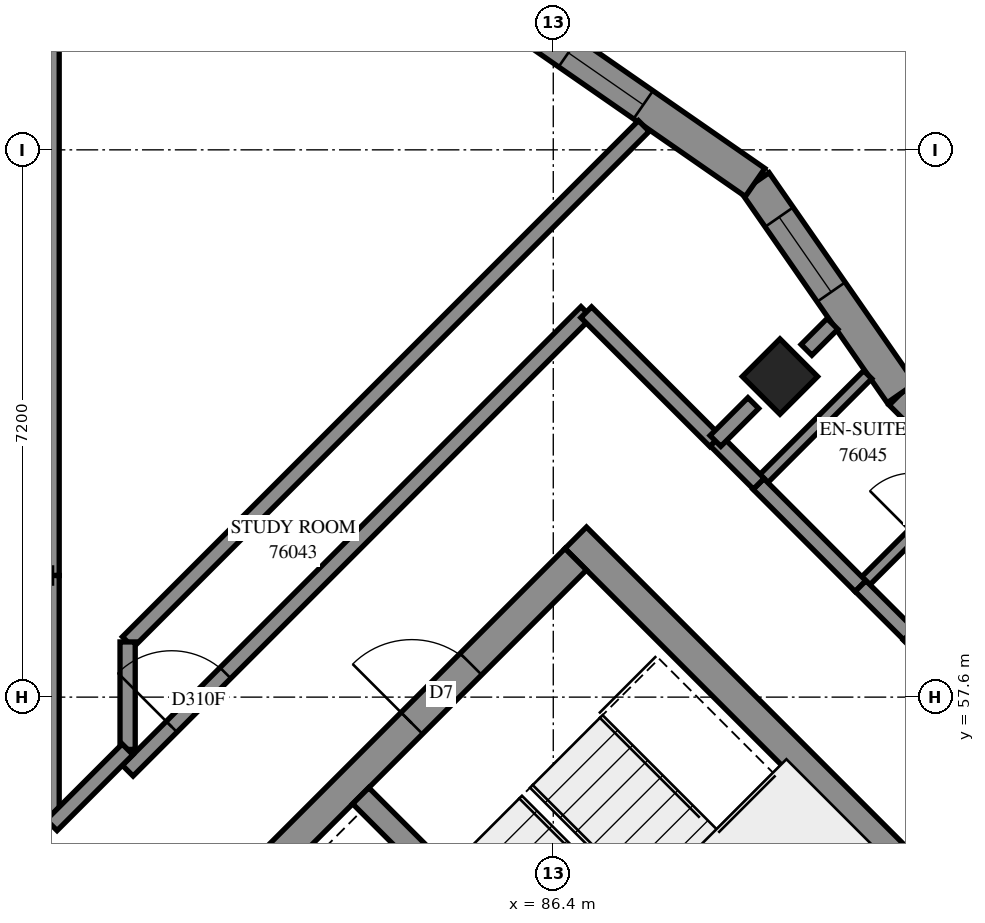
"""IFC4 building model, lengths in metres.
Left out: names, types, materials, properties, quantities, classifications, styles, units other than length and angle.
Written with IfcOpenShell. Run it as: python <this file> out.ifc"""

import sys

from ifc_helpers import new_model, si_unit, direction, frame, frame_2d, origin, origin_2d, place, context, subcontext, project, spatial, polyline, rectangle, outline, extrude, element, fill, save


model = new_model("IFC4")
c1 = context("Model", 3, precision=1e-05, world=origin(), true_north=direction((0.0, 1.0)))
c2 = subcontext(c1, "Body", "Model", "MODEL_VIEW")
j1 = project(units=[si_unit("LENGTHUNIT", "METRE"), si_unit("PLANEANGLEUNIT", "RADIAN")], contexts=[c1])
p1 = place(None, origin())
s1 = spatial("IfcSite", under=j1, at=p1, CompositionType="ELEMENT")
p2 = place(p1, origin())
s2 = spatial("IfcBuilding", under=s1, at=p2, CompositionType="ELEMENT")
p3 = place(p2, frame((0.0, 0.0, 277.8)))
s3 = spatial("IfcBuildingStorey", under=s2, at=p3, CompositionType="ELEMENT", Elevation=277.8)
p4 = place(p3, frame((89.382, 61.818, 0.0), z_axis=(0.0, 0.0, 1.0), x_axis=(0.7071067812, -0.7071067812, 0.0)))
e1 = element("IfcColumn", 1, at=p4, inside=s3, PredefinedType="COLUMN", context=c2, shape_type="SweptSolid", body=[
    extrude(rectangle(XDim=0.7, YDim=0.7, at=origin_2d()), origin(), (0.0, 0.0, 1.0), 3.1),
])
p5 = place(p3, frame((86.695, 59.696, -0.3), z_axis=(0.0, 0.0, 1.0), x_axis=(0.7071100706, -0.7071034917, 0.0)))
e2 = element("IfcWall", 2, at=p5, inside=s3, PredefinedType="SHEAR", context=c2, shape_type="SweptSolid", body=[
    extrude(rectangle(XDim=15.2, YDim=0.4, at=frame_2d((7.6, 0.0))), origin(), (0.0, 0.0, 1.0), 2.7),
])
p6 = place(p5, frame((10.4, 0.0, 0.3)))
e3 = element("IfcOpeningElement", 3, at=p6, cuts=e2, PredefinedType="OPENING", context=c2, shape_type="SweptSolid", body=[
    extrude(rectangle(XDim=0.8, YDim=2.1, at=frame_2d((0.4, 1.05))), frame((0.0, 0.21, 0.0), z_axis=(0.0, -1.0, 0.0), x_axis=(1.0, 0.0, 0.0)), (0.0, 0.0, 1.0), 0.42),
])
p7 = place(p3, frame((76.513, 49.231, -0.3), z_axis=(0.0, 0.0, 1.0), x_axis=(0.7071067812, 0.7071067812, 0.0)))
e4 = element("IfcWall", 4, at=p7, inside=s3, PredefinedType="SHEAR", context=c2, shape_type="SweptSolid", body=[
    extrude(rectangle(XDim=14.4, YDim=0.4, at=frame_2d((7.2, 0.0))), origin(), (0.0, 0.0, 1.0), 2.7),
])
p8 = place(p7, frame((4.55, 0.0, 0.3)))
e5 = element("IfcOpeningElement", 5, at=p8, cuts=e4, PredefinedType="OPENING", context=c2, shape_type="SweptSolid", body=[
    extrude(rectangle(XDim=1.1, YDim=2.1, at=frame_2d((0.55, 1.05))), frame((0.0, 0.21, 0.0), z_axis=(0.0, -1.0, 0.0), x_axis=(1.0, 0.0, 0.0)), (0.0, 0.0, 1.0), 0.42),
])
p9 = place(p7, frame((11.35, 0.0, 0.3)))
e6 = element("IfcOpeningElement", 6, at=p9, cuts=e4, PredefinedType="OPENING", context=c2, shape_type="SweptSolid", body=[
    extrude(rectangle(XDim=1.1, YDim=2.1, at=frame_2d((0.55, 1.05))), frame((0.0, 0.21, 0.0), z_axis=(0.0, -1.0, 0.0), x_axis=(1.0, 0.0, 0.0)), (0.0, 0.0, 1.0), 0.42),
])
p10 = place(p3, frame((83.867, 56.302, 0.0), z_axis=(0.0, 0.0, 1.0), x_axis=(0.7071137256, -0.7070998367, 0.0)))
e7 = element("IfcWall", 7, at=p10, inside=s3, PredefinedType="SOLIDWALL", context=c2, shape_type="SweptSolid", body=[
    extrude(rectangle(XDim=7.2, YDim=0.3, at=frame_2d((3.6, 0.0))), origin(), (0.0, 0.0, 1.0), 3.1),
])
p11 = place(p3, frame((95.716, 56.863, 0.0), z_axis=(0.0, 0.0, 1.0), x_axis=(-0.7071067812, 0.7071067812, 0.0)))
e8 = element("IfcWall", 8, at=p11, inside=s3, PredefinedType="SOLIDWALL", context=c2, shape_type="SweptSolid", body=[
    extrude(outline(polyline([(0.0, -0.225), (6.679, -0.225), (6.719, 0.225), (0.0, 0.225), (0.0, -0.225)])), origin(), (0.0, 0.0, 1.0), 3.1),
])
p12 = place(p11, frame((1.181, 0.0, 0.45)))
e9 = element("IfcOpeningElement", 9, at=p12, cuts=e8, PredefinedType="OPENING", context=c2, shape_type="SweptSolid", body=[
    extrude(rectangle(XDim=2.8, YDim=2.55, at=frame_2d((1.4, 1.275))), frame((0.0, 0.235, 0.0), z_axis=(0.0, -1.0, 0.0), x_axis=(1.0, 0.0, 0.0)), (0.0, 0.0, 1.0), 0.47),
])
p13 = place(p3, frame((90.978, 61.6, 0.0), z_axis=(0.0, 0.0, 1.0), x_axis=(-0.5702085576, 0.82149997, 0.0)))
e10 = element("IfcWall", 10, at=p13, inside=s3, PredefinedType="SOLIDWALL", context=c2, shape_type="SweptSolid", body=[
    extrude(outline(polyline([(0.02, -0.225), (3.414, -0.225), (3.332, 0.225), (-0.02, 0.225), (0.02, -0.225)])), origin(), (0.0, 0.0, 1.0), 3.1),
])
p14 = place(p13, frame((1.618, 0.0, 0.45)))
e11 = element("IfcOpeningElement", 11, at=p14, cuts=e10, PredefinedType="OPENING", context=c2, shape_type="SweptSolid", body=[
    extrude(rectangle(XDim=1.2, YDim=2.55, at=frame_2d((0.6, 1.275))), frame((0.0, 0.235, 0.0), z_axis=(0.0, -1.0, 0.0), x_axis=(1.0, 0.0, 0.0)), (0.0, 0.0, 1.0), 0.47),
])
p15 = place(p3, frame((89.055, 64.371, 0.0), z_axis=(0.0, 0.0, 1.0), x_axis=(-0.8214903631, 0.5702223982, 0.0)))
e12 = element("IfcWall", 12, at=p15, inside=s3, PredefinedType="SOLIDWALL", context=c2, shape_type="SweptSolid", body=[
    extrude(outline(polyline([(-0.041, -0.225), (3.353, -0.225), (3.434, 0.225), (0.041, 0.225), (-0.041, -0.225)])), origin(), (0.0, 0.0, 1.0), 3.1),
])
p16 = place(p15, frame((1.791, 0.0, 0.45)))
e13 = element("IfcOpeningElement", 13, at=p16, cuts=e12, PredefinedType="OPENING", context=c2, shape_type="SweptSolid", body=[
    extrude(rectangle(XDim=1.2, YDim=2.55, at=frame_2d((0.6, 1.275))), frame((0.0, 0.235, 0.0), z_axis=(0.0, -1.0, 0.0), x_axis=(1.0, 0.0, 0.0)), (0.0, 0.0, 1.0), 0.47),
])
p17 = place(p3, frame((79.8, 59.2, 0.0), z_axis=(0.0, 0.0, 1.0), x_axis=(0.0, 1.0, 0.0)))
e14 = element("IfcWall", 14, at=p17, inside=s3, PredefinedType="PARTITIONING", context=c2, shape_type="SweptSolid", body=[
    extrude(rectangle(XDim=13.8, YDim=0.2, at=frame_2d((6.9, 0.0))), origin(), (0.0, 0.0, 1.0), 3.1),
])
p18 = place(p3, frame((80.803, 58.323, 0.0), z_axis=(0.0, 0.0, 1.0), x_axis=(0.7070026249, 0.7072109222, 0.0)))
e15 = element("IfcWall", 15, at=p18, inside=s3, PredefinedType="PARTITIONING", context=c2, shape_type="SweptSolid", body=[
    extrude(rectangle(XDim=9.602, YDim=0.2, at=frame_2d((4.801, 0.0))), origin(), (0.0, 0.0, 1.0), 3.1),
])
p19 = place(p3, frame((80.802, 56.633, 0.0), z_axis=(0.0, 0.0, 1.0), x_axis=(0.7071067812, 0.7071067812, 0.0)))
e16 = element("IfcWall", 16, at=p19, inside=s3, PredefinedType="PARTITIONING", context=c2, shape_type="SweptSolid", body=[
    extrude(rectangle(XDim=8.533, YDim=0.2, at=frame_2d((4.267, 0.0))), origin(), (0.0, 0.0, 1.0), 3.1),
])
p20 = place(p19, frame((0.817, 0.0, 0.0)))
e17 = element("IfcOpeningElement", 17, at=p20, cuts=e16, PredefinedType="OPENING", context=c2, shape_type="SweptSolid", body=[
    extrude(rectangle(XDim=1.0, YDim=2.1, at=frame_2d((0.5, 1.05))), frame((0.0, 0.11, 0.0), z_axis=(0.0, -1.0, 0.0), x_axis=(1.0, 0.0, 0.0)), (0.0, 0.0, 1.0), 0.22),
])
p21 = place(p3, frame((91.077, 58.421, 0.0), z_axis=(0.0, 0.0, 1.0), x_axis=(0.7069703926, -0.7072431435, 0.0)))
e18 = element("IfcWall", 18, at=p21, inside=s3, PredefinedType="PARTITIONING", context=c2, shape_type="SweptSolid", body=[
    extrude(rectangle(XDim=4.4, YDim=0.2, at=frame_2d((2.2, 0.0))), origin(), (0.0, 0.0, 1.0), 3.1),
])
p22 = place(p21, frame((2.132, 0.0, 0.0)))
e19 = element("IfcOpeningElement", 19, at=p22, cuts=e18, PredefinedType="OPENING", context=c2, shape_type="SweptSolid", body=[
    extrude(rectangle(XDim=0.9, YDim=2.1, at=frame_2d((0.45, 1.05))), frame((0.0, 0.11, 0.0), z_axis=(0.0, -1.0, 0.0), x_axis=(1.0, 0.0, 0.0)), (0.0, 0.0, 1.0), 0.22),
])
p23 = place(p3, frame((79.8, 55.914, 0.0), z_axis=(0.0, 0.0, 1.0), x_axis=(0.0, 1.0, 0.0)))
e20 = element("IfcWall", 20, at=p23, inside=s3, PredefinedType="PARTITIONING", context=c2, shape_type="SweptSolid", body=[
    extrude(rectangle(XDim=3.286, YDim=0.2, at=frame_2d((1.643, 0.0))), origin(), (0.0, 0.0, 1.0), 3.1),
])
p24 = place(p3, frame((86.833, 62.663, 0.0), z_axis=(0.0, 0.0, 1.0), x_axis=(0.7075233388, -0.706689978, 0.0)))
e21 = element("IfcWall", 21, at=p24, inside=s3, PredefinedType="PARTITIONING", context=c2, shape_type="SweptSolid", body=[
    extrude(rectangle(XDim=2.4, YDim=0.2, at=frame_2d((1.2, 0.0))), origin(), (0.0, 0.0, 1.0), 3.1),
])
p25 = place(p3, frame((89.099, 60.405, 0.0), z_axis=(0.0, 0.0, 1.0), x_axis=(0.7071067812, 0.7071067812, 0.0)))
e22 = element("IfcWall", 22, at=p25, inside=s3, PredefinedType="PARTITIONING", context=c2, shape_type="SweptSolid", body=[
    extrude(rectangle(XDim=2.033, YDim=0.15, at=frame_2d((1.016, 0.0))), origin(), (0.0, 0.0, 1.0), 3.1),
])
p26 = place(p3, frame((90.442, 59.06, 0.0), z_axis=(0.0, 0.0, 1.0), x_axis=(0.7076448457, 0.7065683069, 0.0)))
e23 = element("IfcWall", 23, at=p26, inside=s3, PredefinedType="PARTITIONING", context=c2, shape_type="SweptSolid", body=[
    extrude(rectangle(XDim=1.951, YDim=0.15, at=frame_2d((0.975, 0.0))), origin(), (0.0, 0.0, 1.0), 3.1),
])
p27 = place(p26, frame((0.973, 0.0, 0.0)))
e24 = element("IfcOpeningElement", 24, at=p27, cuts=e23, PredefinedType="OPENING", context=c2, shape_type="SweptSolid", body=[
    extrude(rectangle(XDim=0.8, YDim=2.1, at=frame_2d((0.4, 1.05))), frame((0.0, 0.085, 0.0), z_axis=(0.0, -1.0, 0.0), x_axis=(1.0, 0.0, 0.0)), (0.0, 0.0, 1.0), 0.17),
])
p28 = place(p3, frame((89.1, 60.404, 0.0), z_axis=(0.0, 0.0, 1.0), x_axis=(0.7065800724, -0.7076330979, 0.0)))
e25 = element("IfcWall", 25, at=p28, inside=s3, PredefinedType="PARTITIONING", context=c2, shape_type="SweptSolid", body=[
    extrude(rectangle(XDim=1.899, YDim=0.2, at=frame_2d((0.95, 0.0))), origin(), (0.0, 0.0, 1.0), 3.1),
])
p29 = place(p3, frame((80.8, 56.912, 0.0), z_axis=(0.0, 0.0, 1.0), x_axis=(0.0, 1.0, 0.0)))
e26 = element("IfcWall", 26, at=p29, inside=s3, PredefinedType="PARTITIONING", context=c2, shape_type="SweptSolid", body=[
    extrude(rectangle(XDim=1.414, YDim=0.2, at=frame_2d((0.707, 0.0))), origin(), (0.0, 0.0, 1.0), 3.1),
])
p30 = place(p3, frame((79.801, 55.915, 0.0), z_axis=(0.0, 0.0, 1.0), x_axis=(0.7071067812, 0.7071067812, 0.0)))
e27 = element("IfcWall", 27, at=p30, inside=s3, PredefinedType="PARTITIONING", context=c2, shape_type="SweptSolid", body=[
    extrude(rectangle(XDim=1.411, YDim=0.2, at=frame_2d((0.706, 0.0))), origin(), (0.0, 0.0, 1.0), 3.1),
])
p31 = place(p3, frame((90.443, 59.061, 0.0), z_axis=(0.0, 0.0, 1.0), x_axis=(0.7082159662, -0.7059958535, 0.0)))
e28 = element("IfcWall", 28, at=p31, inside=s3, PredefinedType="PARTITIONING", context=c2, shape_type="SweptSolid", body=[
    extrude(rectangle(XDim=0.901, YDim=0.2, at=frame_2d((0.451, 0.0))), origin(), (0.0, 0.0, 1.0), 3.1),
])
p32 = place(p3, frame((88.537, 60.973, 0.0), z_axis=(0.0, 0.0, 1.0), x_axis=(0.7071067812, -0.7071067812, 0.0)))
e29 = element("IfcWall", 29, at=p32, inside=s3, PredefinedType="PARTITIONING", context=c2, shape_type="SweptSolid", body=[
    extrude(rectangle(XDim=0.8, YDim=0.2, at=frame_2d((0.4, 0.0))), origin(), (0.0, 0.0, 1.0), 3.1),
])
p33 = place(p3, frame((88.534, 60.971, 0.0), z_axis=(0.0, 0.0, 1.0), x_axis=(0.7071067812, 0.7071067812, 0.0)))
e30 = element("IfcWall", 30, at=p33, inside=s3, PredefinedType="PARTITIONING", context=c2, shape_type="SweptSolid", body=[
    extrude(rectangle(XDim=0.704, YDim=0.2, at=frame_2d((0.352, 0.0))), origin(), (0.0, 0.0, 1.0), 3.1),
])
p34 = place(p3, frame((89.731, 62.169, 0.0), z_axis=(0.0, 0.0, 1.0), x_axis=(0.7071067812, 0.7071067812, 0.0)))
e31 = element("IfcWall", 31, at=p34, inside=s3, PredefinedType="PARTITIONING", context=c2, shape_type="SweptSolid", body=[
    extrude(rectangle(XDim=0.483, YDim=0.2, at=frame_2d((0.241, 0.0))), origin(), (0.0, 0.0, 1.0), 3.1),
])
p35 = place(p14, origin())
e32 = element("IfcWindow", 32, at=p35, inside=s3, PartitioningType="SINGLE_PANEL", PredefinedType="WINDOW", context=c2, shape_type="SweptSolid", body=[
    extrude(rectangle(XDim=1.2, YDim=2.55, at=frame_2d((0.6, 1.275))), frame((0.0, 0.205, 0.0), z_axis=(0.0, -1.0, 0.0), x_axis=(1.0, 0.0, 0.0)), (0.0, 0.0, 1.0), 0.06),
])
fill(e11, e32)
p36 = place(p16, origin())
e33 = element("IfcWindow", 33, at=p36, inside=s3, PartitioningType="SINGLE_PANEL", PredefinedType="WINDOW", context=c2, shape_type="SweptSolid", body=[
    extrude(rectangle(XDim=1.2, YDim=2.55, at=frame_2d((0.6, 1.275))), frame((0.0, 0.205, 0.0), z_axis=(0.0, -1.0, 0.0), x_axis=(1.0, 0.0, 0.0)), (0.0, 0.0, 1.0), 0.06),
])
fill(e13, e33)
p37 = place(p9, origin())
e34 = element("IfcDoor", 34, at=p37, inside=s3, OperationType="SINGLE_SWING_LEFT", PredefinedType="DOOR", context=c2, shape_type="SweptSolid", body=[
    extrude(rectangle(XDim=1.1, YDim=2.1, at=frame_2d((0.55, 1.05))), frame((0.0, 0.025, 0.0), z_axis=(0.0, -1.0, 0.0), x_axis=(1.0, 0.0, 0.0)), (0.0, 0.0, 1.0), 0.05),
])
fill(e6, e34)
p38 = place(p20, origin())
e35 = element("IfcDoor", 35, at=p38, inside=s3, OperationType="SINGLE_SWING_RIGHT", PredefinedType="DOOR", context=c2, shape_type="SweptSolid", body=[
    extrude(rectangle(XDim=1.0, YDim=2.1, at=frame_2d((0.5, 1.05))), frame((0.0, 0.025, 0.0), z_axis=(0.0, -1.0, 0.0), x_axis=(1.0, 0.0, 0.0)), (0.0, 0.0, 1.0), 0.05),
])
fill(e17, e35)
save(model, sys.argv[1])
